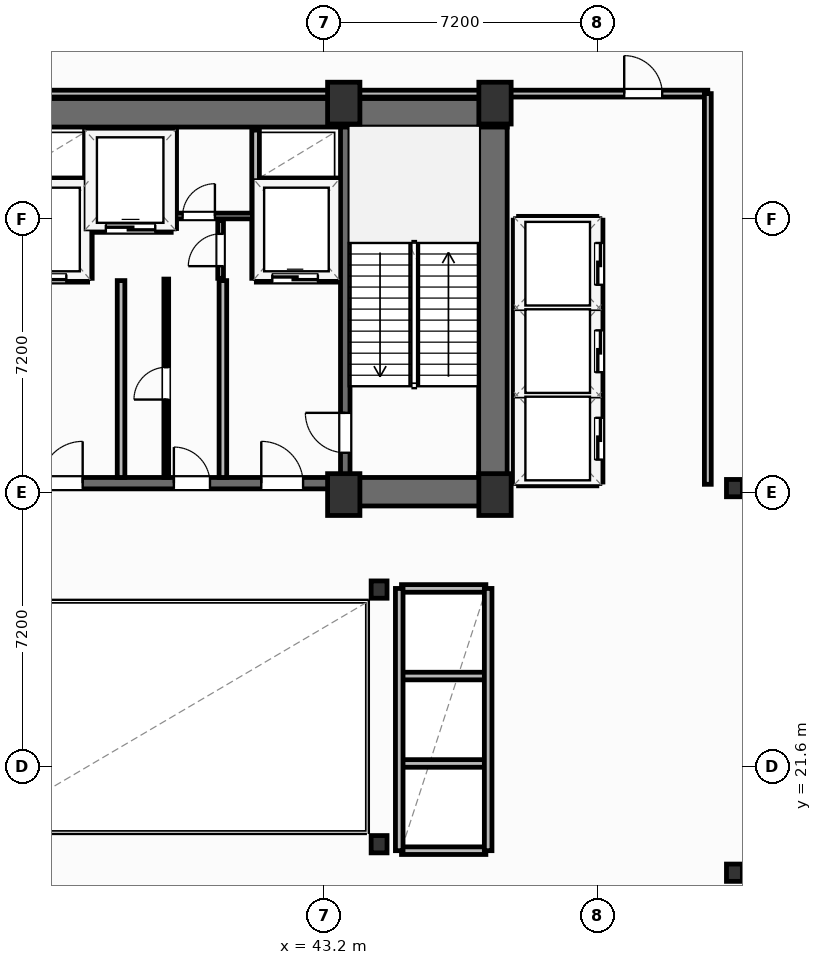
"""IFC4 building model, lengths in metres.
Left out: names, types, materials, properties, quantities, classifications, styles, units other than length and angle.
Written with IfcOpenShell. Run it as: python <this file> out.ifc"""

import sys

from ifc_helpers import new_model, si_unit, direction, frame, frame_2d, origin, origin_2d, place, context, subcontext, project, spatial, rectangle, i_section, extrude, element, fill, save


model = new_model("IFC4")
c1 = context("Model", 3, precision=1e-05, world=origin(), true_north=direction((0.0, 1.0)))
c2 = subcontext(c1, "Body", "Model", "MODEL_VIEW")
j1 = project(units=[si_unit("LENGTHUNIT", "METRE"), si_unit("PLANEANGLEUNIT", "RADIAN")], contexts=[c1])
p1 = place(None, origin())
s1 = spatial("IfcSite", under=j1, at=p1, CompositionType="ELEMENT")
p2 = place(p1, origin())
s2 = spatial("IfcBuilding", under=s1, at=p2, CompositionType="ELEMENT")
p3 = place(p2, frame((0.0, 0.0, 162.4)))
s3 = spatial("IfcBuildingStorey", under=s2, at=p3, CompositionType="ELEMENT", Elevation=162.4)
for number, where, z_axis, x_axis in (
    (1, (43.72, 28.75, 0.0), (0.0, 0.0, 1.0), (1.0, 0.0, 0.0)),
    (2, (47.7, 28.75, 0.0), (0.0, 0.0, 1.0), (1.0, 0.0, 0.0)),
    (3, (43.72, 39.05, 0.0), (0.0, 0.0, 1.0), (1.0, 0.0, 0.0)),
    (4, (47.7, 39.05, 0.0), (0.0, 0.0, 1.0), (1.0, 0.0, 0.0)),
):
    element("IfcColumn", number, at=place(p3, frame(where, z_axis=z_axis, x_axis=x_axis)), inside=s3, PredefinedType="COLUMN", context=c2, shape_type="SweptSolid", body=[
        extrude(rectangle(XDim=0.85, YDim=1.1, at=origin_2d()), origin(), (0.0, 0.0, 1.0), 4.8),
    ])
for number, where, z_axis, x_axis in (
    (5, (44.65, 19.55, 0.0), (0.0, 0.0, 1.0), (1.0, 0.0, 0.0)),
    (6, (44.65, 26.25, 0.0), (0.0, 0.0, 1.0), (1.0, 0.0, 0.0)),
    (7, (54.0, 18.8, 0.0), (0.0, 0.0, 1.0), (1.0, 0.0, 0.0)),
    (8, (54.0, 28.92, 0.0), (0.0, 0.0, 1.0), (1.0, 0.0, 0.0)),
):
    element("IfcColumn", number, at=place(p3, frame(where, z_axis=z_axis, x_axis=x_axis)), inside=s3, PredefinedType="COLUMN", context=c2, shape_type="SweptSolid", body=[
        extrude(i_section(OverallWidth=0.418, OverallDepth=0.455, WebThickness=0.042, FlangeThickness=0.068, FilletRadius=0.025, at=origin_2d()), origin(), (0.0, 0.0, 1.0), 4.8),
    ])
p4 = place(p3, frame((30.38, 38.795, 0.0), z_axis=(0.0, 0.0, 1.0), x_axis=(1.0, 0.0, 0.0)))
e9 = element("IfcWall", 9, at=p4, inside=s3, PredefinedType="SHEAR", context=c2, shape_type="SweptSolid", body=[
    extrude(rectangle(XDim=17.64, YDim=0.75, at=frame_2d((8.82, 0.0))), origin(), (0.0, 0.0, 1.0), 4.55),
])
p5 = place(p3, frame((47.645, 29.2, 0.0), z_axis=(0.0, 0.0, 1.0), x_axis=(0.0, 1.0, 0.0)))
e10 = element("IfcWall", 10, at=p5, inside=s3, PredefinedType="SHEAR", context=c2, shape_type="SweptSolid", body=[
    extrude(rectangle(XDim=9.22, YDim=0.75, at=frame_2d((4.61, 0.0))), origin(), (0.0, 0.0, 1.0), 4.55),
])
p6 = place(p3, frame((43.6, 28.825, 0.0), z_axis=(0.0, 0.0, 1.0), x_axis=(1.0, 0.0, 0.0)))
e11 = element("IfcWall", 11, at=p6, inside=s3, PredefinedType="SHEAR", context=c2, shape_type="SweptSolid", body=[
    extrude(rectangle(XDim=4.42, YDim=0.75, at=frame_2d((2.21, 0.0))), origin(), (0.0, 0.0, 1.0), 4.55),
])
p7 = place(p3, frame((34.8, 29.05, 0.0), z_axis=(0.0, 0.0, 1.0), x_axis=(1.0, 0.0, 0.0)))
e12 = element("IfcWall", 12, at=p7, inside=s3, PredefinedType="SHEAR", context=c2, shape_type="SweptSolid", body=[
    extrude(rectangle(XDim=8.8, YDim=0.3, at=frame_2d((4.4, 0.0))), origin(), (0.0, 0.0, 1.0), 4.55),
])
p8 = place(p7, frame((0.95, 0.0, 0.0)))
e13 = element("IfcOpeningElement", 13, at=p8, cuts=e12, PredefinedType="OPENING", context=c2, shape_type="SweptSolid", body=[
    extrude(rectangle(XDim=1.1, YDim=2.15, at=frame_2d((0.55, 1.075))), frame((0.0, 0.16, 0.0), z_axis=(0.0, -1.0, 0.0), x_axis=(1.0, 0.0, 0.0)), (0.0, 0.0, 1.0), 0.32),
])
p9 = place(p7, frame((6.75, 0.0, 0.0)))
e14 = element("IfcOpeningElement", 14, at=p9, cuts=e12, PredefinedType="OPENING", context=c2, shape_type="SweptSolid", body=[
    extrude(rectangle(XDim=1.1, YDim=2.15, at=frame_2d((0.55, 1.075))), frame((0.0, 0.16, 0.0), z_axis=(0.0, -1.0, 0.0), x_axis=(1.0, 0.0, 0.0)), (0.0, 0.0, 1.0), 0.32),
])
p10 = place(p7, frame((4.45, 0.0, 0.0)))
e15 = element("IfcOpeningElement", 15, at=p10, cuts=e12, PredefinedType="OPENING", context=c2, shape_type="SweptSolid", body=[
    extrude(rectangle(XDim=0.95, YDim=2.15, at=frame_2d((0.475, 1.075))), frame((0.0, 0.16, 0.0), z_axis=(0.0, -1.0, 0.0), x_axis=(1.0, 0.0, 0.0)), (0.0, 0.0, 1.0), 0.32),
])
p11 = place(p3, frame((43.76, 29.2, 0.0), z_axis=(0.0, 0.0, 1.0), x_axis=(0.0, 1.0, 0.0)))
e16 = element("IfcWall", 16, at=p11, inside=s3, PredefinedType="SHEAR", context=c2, shape_type="SweptSolid", body=[
    extrude(rectangle(XDim=9.22, YDim=0.25, at=frame_2d((4.61, 0.0))), origin(), (0.0, 0.0, 1.0), 4.55),
])
p12 = place(p11, frame((0.65, 0.0, 0.0)))
e17 = element("IfcOpeningElement", 17, at=p12, cuts=e16, PredefinedType="OPENING", context=c2, shape_type="SweptSolid", body=[
    extrude(rectangle(XDim=1.05, YDim=2.15, at=frame_2d((0.525, 1.075))), frame((0.0, 0.135, 0.0), z_axis=(0.0, -1.0, 0.0), x_axis=(1.0, 0.0, 0.0)), (0.0, 0.0, 1.0), 0.27),
])
p13 = place(p3, frame((20.0, 39.3, 0.0), z_axis=(0.0, 0.0, 1.0), x_axis=(1.0, 0.0, 0.0)))
e18 = element("IfcWall", 18, at=p13, inside=s3, PredefinedType="PARTITIONING", context=c2, shape_type="SweptSolid", body=[
    extrude(rectangle(XDim=33.3, YDim=0.18, at=frame_2d((16.65, 0.0))), origin(), (0.0, 0.0, 1.0), 3.762),
])
p14 = place(p13, frame((31.1, 0.0, 0.0)))
e19 = element("IfcOpeningElement", 19, at=p14, cuts=e18, PredefinedType="OPENING", context=c2, shape_type="SweptSolid", body=[
    extrude(rectangle(XDim=1.0, YDim=2.05, at=frame_2d((0.5, 1.025))), frame((0.0, 0.1, 0.0), z_axis=(0.0, -1.0, 0.0), x_axis=(1.0, 0.0, 0.0)), (0.0, 0.0, 1.0), 0.2),
])
p15 = place(p3, frame((53.3, 29.02, 0.0), z_axis=(0.0, 0.0, 1.0), x_axis=(0.0, 1.0, 0.0)))
e20 = element("IfcWall", 20, at=p15, inside=s3, PredefinedType="PARTITIONING", context=c2, shape_type="SweptSolid", body=[
    extrude(rectangle(XDim=10.28, YDim=0.18, at=frame_2d((5.14, 0.0))), origin(), (0.0, 0.0, 1.0), 4.55),
])
for number, where, z_axis, x_axis in (
    (21, (37.86, 29.2, 0.0), (0.0, 0.0, 1.0), (0.0, 1.0, 0.0)),
    (22, (40.54, 29.2, 0.0), (0.0, 0.0, 1.0), (0.0, 1.0, 0.0)),
):
    element("IfcWall", number, at=place(p3, frame(where, z_axis=z_axis, x_axis=x_axis)), inside=s3, PredefinedType="PARTITIONING", context=c2, shape_type="SweptSolid", body=[
        extrude(rectangle(XDim=5.18, YDim=0.2, at=frame_2d((2.59, 0.0))), origin(), (0.0, 0.0, 1.0), 4.55),
    ])
p16 = place(p3, frame((34.8, 34.44, 0.0), z_axis=(0.0, 0.0, 1.0), x_axis=(1.0, 0.0, 0.0)))
e23 = element("IfcWall", 23, at=p16, inside=s3, PredefinedType="PARTITIONING", context=c2, shape_type="SweptSolid", body=[
    extrude(rectangle(XDim=2.18, YDim=0.2, at=frame_2d((1.09, 0.0))), origin(), (0.0, 0.0, 1.0), 4.55),
])
p17 = place(p16, frame((0.42, 0.0, 0.0)))
e24 = element("IfcOpeningElement", 24, at=p17, cuts=e23, PredefinedType="OPENING", context=c2, shape_type="SweptSolid", body=[
    extrude(rectangle(XDim=1.2, YDim=2.2, at=frame_2d((0.6, 1.1))), frame((0.0, 0.11, 0.0), z_axis=(0.0, -1.0, 0.0), x_axis=(1.0, 0.0, 0.0)), (0.0, 0.0, 1.0), 0.22),
])
p18 = place(p3, frame((34.8, 36.98, 0.0), z_axis=(0.0, 0.0, 1.0), x_axis=(1.0, 0.0, 0.0)))
e25 = element("IfcWall", 25, at=p18, inside=s3, PredefinedType="PARTITIONING", context=c2, shape_type="SweptSolid", body=[
    extrude(rectangle(XDim=2.18, YDim=0.2, at=frame_2d((1.09, 0.0))), origin(), (0.0, 0.0, 1.0), 4.55),
])
p19 = place(p3, frame((37.0, 34.44, 0.0), z_axis=(0.0, 0.0, 1.0), x_axis=(0.0, 1.0, 0.0)))
e26 = element("IfcWall", 26, at=p19, inside=s3, PredefinedType="PARTITIONING", context=c2, shape_type="SweptSolid", body=[
    extrude(rectangle(XDim=3.9, YDim=0.2, at=frame_2d((1.95, 0.0))), origin(), (0.0, 0.0, 1.0), 4.55),
])
p20 = place(p3, frame((41.42, 34.44, 0.0), z_axis=(0.0, 0.0, 1.0), x_axis=(1.0, 0.0, 0.0)))
e27 = element("IfcWall", 27, at=p20, inside=s3, PredefinedType="PARTITIONING", context=c2, shape_type="SweptSolid", body=[
    extrude(rectangle(XDim=2.18, YDim=0.2, at=frame_2d((1.09, 0.0))), origin(), (0.0, 0.0, 1.0), 4.55),
])
p21 = place(p20, frame((0.42, 0.0, 0.0)))
e28 = element("IfcOpeningElement", 28, at=p21, cuts=e27, PredefinedType="OPENING", context=c2, shape_type="SweptSolid", body=[
    extrude(rectangle(XDim=1.2, YDim=2.2, at=frame_2d((0.6, 1.1))), frame((0.0, 0.11, 0.0), z_axis=(0.0, -1.0, 0.0), x_axis=(1.0, 0.0, 0.0)), (0.0, 0.0, 1.0), 0.22),
])
p22 = place(p3, frame((41.42, 36.98, 0.0), z_axis=(0.0, 0.0, 1.0), x_axis=(1.0, 0.0, 0.0)))
e29 = element("IfcWall", 29, at=p22, inside=s3, PredefinedType="PARTITIONING", context=c2, shape_type="SweptSolid", body=[
    extrude(rectangle(XDim=2.18, YDim=0.2, at=frame_2d((1.09, 0.0))), origin(), (0.0, 0.0, 1.0), 4.55),
])
p23 = place(p3, frame((41.4, 34.44, 0.0), z_axis=(0.0, 0.0, 1.0), x_axis=(0.0, 1.0, 0.0)))
e30 = element("IfcWall", 30, at=p23, inside=s3, PredefinedType="PARTITIONING", context=c2, shape_type="SweptSolid", body=[
    extrude(rectangle(XDim=3.9, YDim=0.2, at=frame_2d((1.95, 0.0))), origin(), (0.0, 0.0, 1.0), 4.55),
])
p24 = place(p3, frame((37.06, 35.75, 0.0), z_axis=(0.0, 0.0, 1.0), x_axis=(1.0, 0.0, 0.0)))
e31 = element("IfcWall", 31, at=p24, inside=s3, PredefinedType="PARTITIONING", context=c2, shape_type="SweptSolid", body=[
    extrude(rectangle(XDim=2.12, YDim=0.2, at=frame_2d((1.06, 0.0))), origin(), (0.0, 0.0, 1.0), 4.55),
])
p25 = place(p24, frame((0.4, 0.0, 0.0)))
e32 = element("IfcOpeningElement", 32, at=p25, cuts=e31, PredefinedType="OPENING", context=c2, shape_type="SweptSolid", body=[
    extrude(rectangle(XDim=1.3, YDim=2.2, at=frame_2d((0.65, 1.1))), frame((0.0, 0.11, 0.0), z_axis=(0.0, -1.0, 0.0), x_axis=(1.0, 0.0, 0.0)), (0.0, 0.0, 1.0), 0.22),
])
p26 = place(p3, frame((39.22, 35.75, 0.0), z_axis=(0.0, 0.0, 1.0), x_axis=(0.0, 1.0, 0.0)))
e33 = element("IfcWall", 33, at=p26, inside=s3, PredefinedType="PARTITIONING", context=c2, shape_type="SweptSolid", body=[
    extrude(rectangle(XDim=2.59, YDim=0.2, at=frame_2d((1.295, 0.0))), origin(), (0.0, 0.0, 1.0), 4.55),
])
p27 = place(p3, frame((39.3, 36.08, 0.0), z_axis=(0.0, 0.0, 1.0), x_axis=(1.0, 0.0, 0.0)))
e34 = element("IfcWall", 34, at=p27, inside=s3, PredefinedType="PARTITIONING", context=c2, shape_type="SweptSolid", body=[
    extrude(rectangle(XDim=2.02, YDim=0.15, at=frame_2d((1.01, 0.0))), origin(), (0.0, 0.0, 1.0), 4.55),
])
p28 = place(p27, frame((0.18, 0.0, 0.0)))
e35 = element("IfcOpeningElement", 35, at=p28, cuts=e34, PredefinedType="OPENING", context=c2, shape_type="SweptSolid", body=[
    extrude(rectangle(XDim=0.85, YDim=2.05, at=frame_2d((0.425, 1.025))), frame((0.0, 0.085, 0.0), z_axis=(0.0, -1.0, 0.0), x_axis=(1.0, 0.0, 0.0)), (0.0, 0.0, 1.0), 0.17),
])
p29 = place(p3, frame((40.48, 34.44, 0.0), z_axis=(0.0, 0.0, 1.0), x_axis=(0.0, 1.0, 0.0)))
e36 = element("IfcWall", 36, at=p29, inside=s3, PredefinedType="PARTITIONING", context=c2, shape_type="SweptSolid", body=[
    extrude(rectangle(XDim=1.52, YDim=0.15, at=frame_2d((0.76, 0.0))), origin(), (0.0, 0.0, 1.0), 4.55),
])
p30 = place(p29, frame((0.32, 0.0, 0.0)))
e37 = element("IfcOpeningElement", 37, at=p30, cuts=e36, PredefinedType="OPENING", context=c2, shape_type="SweptSolid", body=[
    extrude(rectangle(XDim=0.85, YDim=2.05, at=frame_2d((0.425, 1.025))), frame((0.0, 0.085, 0.0), z_axis=(0.0, -1.0, 0.0), x_axis=(1.0, 0.0, 0.0)), (0.0, 0.0, 1.0), 0.17),
])
p31 = place(p3, frame((39.05, 29.2, 0.0), z_axis=(0.0, 0.0, 1.0), x_axis=(0.0, 1.0, 0.0)))
e38 = element("IfcWall", 38, at=p31, inside=s3, PredefinedType="PARTITIONING", context=c2, shape_type="SweptSolid", body=[
    extrude(rectangle(XDim=5.22, YDim=0.125, at=frame_2d((2.61, 0.0))), origin(), (0.0, 0.0, 1.0), 4.55),
])
p32 = place(p31, frame((2.05, 0.0, 0.0)))
e39 = element("IfcOpeningElement", 39, at=p32, cuts=e38, PredefinedType="OPENING", context=c2, shape_type="SweptSolid", body=[
    extrude(rectangle(XDim=0.85, YDim=2.05, at=frame_2d((0.425, 1.025))), frame((0.0, 0.073, 0.0), z_axis=(0.0, -1.0, 0.0), x_axis=(1.0, 0.0, 0.0)), (0.0, 0.0, 1.0), 0.145),
])
for number, where, z_axis, x_axis in (
    (40, (48.32, 31.375, 0.0), (0.0, 0.0, 1.0), (1.0, 0.0, 0.0)),
    (41, (48.32, 33.675, 0.0), (0.0, 0.0, 1.0), (1.0, 0.0, 0.0)),
):
    element("IfcWall", number, at=place(p3, frame(where, z_axis=z_axis, x_axis=x_axis)), inside=s3, PredefinedType="PARTITIONING", context=c2, shape_type="SweptSolid", body=[
        extrude(rectangle(XDim=2.06, YDim=0.2, at=frame_2d((1.03, 0.0))), origin(), (0.0, 0.0, 1.0), 4.55),
    ])
p33 = place(p3, frame((48.32, 29.08, 0.0), z_axis=(0.0, 0.0, 1.0), x_axis=(1.0, 0.0, 0.0)))
e42 = element("IfcWall", 42, at=p33, inside=s3, PredefinedType="PARTITIONING", context=c2, shape_type="SweptSolid", body=[
    extrude(rectangle(XDim=2.06, YDim=0.2, at=frame_2d((1.03, 0.0))), origin(), (0.0, 0.0, 1.0), 3.762),
])
p34 = place(p3, frame((48.32, 35.97, 0.0), z_axis=(0.0, 0.0, 1.0), x_axis=(1.0, 0.0, 0.0)))
e43 = element("IfcWall", 43, at=p34, inside=s3, PredefinedType="PARTITIONING", context=c2, shape_type="SweptSolid", body=[
    extrude(rectangle(XDim=2.06, YDim=0.2, at=frame_2d((1.03, 0.0))), origin(), (0.0, 0.0, 1.0), 4.55),
])
p35 = place(p3, frame((48.28, 29.08, 0.0), z_axis=(0.0, 0.0, 1.0), x_axis=(0.0, 1.0, 0.0)))
e44 = element("IfcWall", 44, at=p35, inside=s3, PredefinedType="PARTITIONING", context=c2, shape_type="SweptSolid", body=[
    extrude(rectangle(XDim=6.89, YDim=0.2, at=frame_2d((3.445, 0.0))), origin(), (0.0, 0.0, 1.0), 4.55),
])
p36 = place(p3, frame((50.44, 29.08, 0.0), z_axis=(0.0, 0.0, 1.0), x_axis=(0.0, 1.0, 0.0)))
e45 = element("IfcWall", 45, at=p36, inside=s3, PredefinedType="PARTITIONING", context=c2, shape_type="SweptSolid", body=[
    extrude(rectangle(XDim=6.89, YDim=0.2, at=frame_2d((3.445, 0.0))), origin(), (0.0, 0.0, 1.0), 4.55),
])
p37 = place(p36, frame((0.59, 0.0, 0.0)))
e46 = element("IfcOpeningElement", 46, at=p37, cuts=e45, PredefinedType="OPENING", context=c2, shape_type="SweptSolid", body=[
    extrude(rectangle(XDim=1.1, YDim=2.15, at=frame_2d((0.55, 1.075))), frame((0.0, 0.11, 0.0), z_axis=(0.0, -1.0, 0.0), x_axis=(1.0, 0.0, 0.0)), (0.0, 0.0, 1.0), 0.22),
])
p38 = place(p36, frame((2.89, 0.0, 0.0)))
e47 = element("IfcOpeningElement", 47, at=p38, cuts=e45, PredefinedType="OPENING", context=c2, shape_type="SweptSolid", body=[
    extrude(rectangle(XDim=1.1, YDim=2.15, at=frame_2d((0.55, 1.075))), frame((0.0, 0.11, 0.0), z_axis=(0.0, -1.0, 0.0), x_axis=(1.0, 0.0, 0.0)), (0.0, 0.0, 1.0), 0.22),
])
p39 = place(p36, frame((5.19, 0.0, 0.0)))
e48 = element("IfcOpeningElement", 48, at=p39, cuts=e45, PredefinedType="OPENING", context=c2, shape_type="SweptSolid", body=[
    extrude(rectangle(XDim=1.1, YDim=2.15, at=frame_2d((0.55, 1.075))), frame((0.0, 0.11, 0.0), z_axis=(0.0, -1.0, 0.0), x_axis=(1.0, 0.0, 0.0)), (0.0, 0.0, 1.0), 0.22),
])
for number, where, z_axis, x_axis in (
    (49, (45.24, 21.675, 0.0), (0.0, 0.0, 1.0), (1.0, 0.0, 0.0)),
    (50, (45.24, 23.975, 0.0), (0.0, 0.0, 1.0), (1.0, 0.0, 0.0)),
):
    element("IfcWall", number, at=place(p3, frame(where, z_axis=z_axis, x_axis=x_axis)), inside=s3, PredefinedType="PARTITIONING", context=c2, shape_type="SweptSolid", body=[
        extrude(rectangle(XDim=2.22, YDim=0.2, at=frame_2d((1.11, 0.0))), origin(), (0.0, 0.0, 1.0), 4.55),
    ])
p40 = place(p3, frame((45.24, 19.38, 0.0), z_axis=(0.0, 0.0, 1.0), x_axis=(1.0, 0.0, 0.0)))
e51 = element("IfcWall", 51, at=p40, inside=s3, PredefinedType="PARTITIONING", context=c2, shape_type="SweptSolid", body=[
    extrude(rectangle(XDim=2.22, YDim=0.2, at=frame_2d((1.11, 0.0))), origin(), (0.0, 0.0, 1.0), 3.762),
])
p41 = place(p3, frame((45.24, 26.28, 0.0), z_axis=(0.0, 0.0, 1.0), x_axis=(1.0, 0.0, 0.0)))
e52 = element("IfcWall", 52, at=p41, inside=s3, PredefinedType="PARTITIONING", context=c2, shape_type="SweptSolid", body=[
    extrude(rectangle(XDim=2.22, YDim=0.2, at=frame_2d((1.11, 0.0))), origin(), (0.0, 0.0, 1.0), 4.55),
])
for number, where, z_axis, x_axis in (
    (53, (45.18, 19.38, 0.0), (0.0, 0.0, 1.0), (0.0, 1.0, 0.0)),
    (54, (47.52, 19.38, 0.0), (0.0, 0.0, 1.0), (0.0, 1.0, 0.0)),
):
    element("IfcWall", number, at=place(p3, frame(where, z_axis=z_axis, x_axis=x_axis)), inside=s3, PredefinedType="PARTITIONING", context=c2, shape_type="SweptSolid", body=[
        extrude(rectangle(XDim=6.9, YDim=0.2, at=frame_2d((3.45, 0.0))), origin(), (0.0, 0.0, 1.0), 4.55),
    ])
p42 = place(p14, origin())
e55 = element("IfcDoor", 55, at=p42, inside=s3, OperationType="SINGLE_SWING_LEFT", PredefinedType="DOOR", context=c2, shape_type="SweptSolid", body=[
    extrude(rectangle(XDim=1.0, YDim=2.05, at=frame_2d((0.5, 1.025))), frame((0.0, 0.025, 0.0), z_axis=(0.0, -1.0, 0.0), x_axis=(1.0, 0.0, 0.0)), (0.0, 0.0, 1.0), 0.05),
])
fill(e19, e55)
p43 = place(p12, origin())
e56 = element("IfcDoor", 56, at=p43, inside=s3, OperationType="SINGLE_SWING_RIGHT", PredefinedType="DOOR", context=c2, shape_type="SweptSolid", body=[
    extrude(rectangle(XDim=1.05, YDim=2.15, at=frame_2d((0.525, 1.075))), frame((0.0, 0.025, 0.0), z_axis=(0.0, -1.0, 0.0), x_axis=(1.0, 0.0, 0.0)), (0.0, 0.0, 1.0), 0.05),
])
fill(e17, e56)
p44 = place(p8, origin())
e57 = element("IfcDoor", 57, at=p44, inside=s3, OperationType="SINGLE_SWING_RIGHT", PredefinedType="DOOR", context=c2, shape_type="SweptSolid", body=[
    extrude(rectangle(XDim=1.1, YDim=2.15, at=frame_2d((0.55, 1.075))), frame((0.0, 0.025, 0.0), z_axis=(0.0, -1.0, 0.0), x_axis=(1.0, 0.0, 0.0)), (0.0, 0.0, 1.0), 0.05),
])
fill(e13, e57)
p45 = place(p9, origin())
e58 = element("IfcDoor", 58, at=p45, inside=s3, OperationType="SINGLE_SWING_LEFT", PredefinedType="DOOR", context=c2, shape_type="SweptSolid", body=[
    extrude(rectangle(XDim=1.1, YDim=2.15, at=frame_2d((0.55, 1.075))), frame((0.0, 0.025, 0.0), z_axis=(0.0, -1.0, 0.0), x_axis=(1.0, 0.0, 0.0)), (0.0, 0.0, 1.0), 0.05),
])
fill(e14, e58)
p46 = place(p17, origin())
e59 = element("IfcDoor", 59, at=p46, inside=s3, OperationType="SLIDING_TO_LEFT", PredefinedType="DOOR", context=c2, shape_type="SweptSolid", body=[
    extrude(rectangle(XDim=1.2, YDim=2.2, at=frame_2d((0.6, 1.1))), frame((0.0, 0.025, 0.0), z_axis=(0.0, -1.0, 0.0), x_axis=(1.0, 0.0, 0.0)), (0.0, 0.0, 1.0), 0.05),
])
fill(e24, e59)
p47 = place(p21, origin())
e60 = element("IfcDoor", 60, at=p47, inside=s3, OperationType="SLIDING_TO_LEFT", PredefinedType="DOOR", context=c2, shape_type="SweptSolid", body=[
    extrude(rectangle(XDim=1.2, YDim=2.2, at=frame_2d((0.6, 1.1))), frame((0.0, 0.025, 0.0), z_axis=(0.0, -1.0, 0.0), x_axis=(1.0, 0.0, 0.0)), (0.0, 0.0, 1.0), 0.05),
])
fill(e28, e60)
p48 = place(p25, origin())
e61 = element("IfcDoor", 61, at=p48, inside=s3, OperationType="SLIDING_TO_LEFT", PredefinedType="DOOR", context=c2, shape_type="SweptSolid", body=[
    extrude(rectangle(XDim=1.3, YDim=2.2, at=frame_2d((0.65, 1.1))), frame((0.0, 0.025, 0.0), z_axis=(0.0, -1.0, 0.0), x_axis=(1.0, 0.0, 0.0)), (0.0, 0.0, 1.0), 0.05),
])
fill(e32, e61)
p49 = place(p28, origin())
e62 = element("IfcDoor", 62, at=p49, inside=s3, OperationType="SINGLE_SWING_RIGHT", PredefinedType="DOOR", context=c2, shape_type="SweptSolid", body=[
    extrude(rectangle(XDim=0.85, YDim=2.05, at=frame_2d((0.425, 1.025))), frame((0.0, 0.025, 0.0), z_axis=(0.0, -1.0, 0.0), x_axis=(1.0, 0.0, 0.0)), (0.0, 0.0, 1.0), 0.05),
])
fill(e35, e62)
p50 = place(p30, origin())
e63 = element("IfcDoor", 63, at=p50, inside=s3, OperationType="SINGLE_SWING_LEFT", PredefinedType="DOOR", context=c2, shape_type="SweptSolid", body=[
    extrude(rectangle(XDim=0.85, YDim=2.05, at=frame_2d((0.425, 1.025))), frame((0.0, 0.025, 0.0), z_axis=(0.0, -1.0, 0.0), x_axis=(1.0, 0.0, 0.0)), (0.0, 0.0, 1.0), 0.05),
])
fill(e37, e63)
p51 = place(p32, origin())
e64 = element("IfcDoor", 64, at=p51, inside=s3, OperationType="SINGLE_SWING_LEFT", PredefinedType="DOOR", context=c2, shape_type="SweptSolid", body=[
    extrude(rectangle(XDim=0.85, YDim=2.05, at=frame_2d((0.425, 1.025))), frame((0.0, 0.025, 0.0), z_axis=(0.0, -1.0, 0.0), x_axis=(1.0, 0.0, 0.0)), (0.0, 0.0, 1.0), 0.05),
])
fill(e39, e64)
p52 = place(p10, origin())
e65 = element("IfcDoor", 65, at=p52, inside=s3, OperationType="SINGLE_SWING_LEFT", PredefinedType="DOOR", context=c2, shape_type="SweptSolid", body=[
    extrude(rectangle(XDim=0.95, YDim=2.15, at=frame_2d((0.475, 1.075))), frame((0.0, 0.025, 0.0), z_axis=(0.0, -1.0, 0.0), x_axis=(1.0, 0.0, 0.0)), (0.0, 0.0, 1.0), 0.05),
])
fill(e15, e65)
p53 = place(p37, origin())
e66 = element("IfcDoor", 66, at=p53, inside=s3, OperationType="SLIDING_TO_LEFT", PredefinedType="DOOR", context=c2, shape_type="SweptSolid", body=[
    extrude(rectangle(XDim=1.1, YDim=2.15, at=frame_2d((0.55, 1.075))), frame((0.0, 0.025, 0.0), z_axis=(0.0, -1.0, 0.0), x_axis=(1.0, 0.0, 0.0)), (0.0, 0.0, 1.0), 0.05),
])
fill(e46, e66)
p54 = place(p38, origin())
e67 = element("IfcDoor", 67, at=p54, inside=s3, OperationType="SLIDING_TO_LEFT", PredefinedType="DOOR", context=c2, shape_type="SweptSolid", body=[
    extrude(rectangle(XDim=1.1, YDim=2.15, at=frame_2d((0.55, 1.075))), frame((0.0, 0.025, 0.0), z_axis=(0.0, -1.0, 0.0), x_axis=(1.0, 0.0, 0.0)), (0.0, 0.0, 1.0), 0.05),
])
fill(e47, e67)
p55 = place(p39, origin())
e68 = element("IfcDoor", 68, at=p55, inside=s3, OperationType="SLIDING_TO_LEFT", PredefinedType="DOOR", context=c2, shape_type="SweptSolid", body=[
    extrude(rectangle(XDim=1.1, YDim=2.15, at=frame_2d((0.55, 1.075))), frame((0.0, 0.025, 0.0), z_axis=(0.0, -1.0, 0.0), x_axis=(1.0, 0.0, 0.0)), (0.0, 0.0, 1.0), 0.05),
])
fill(e48, e68)
save(model, sys.argv[1])
